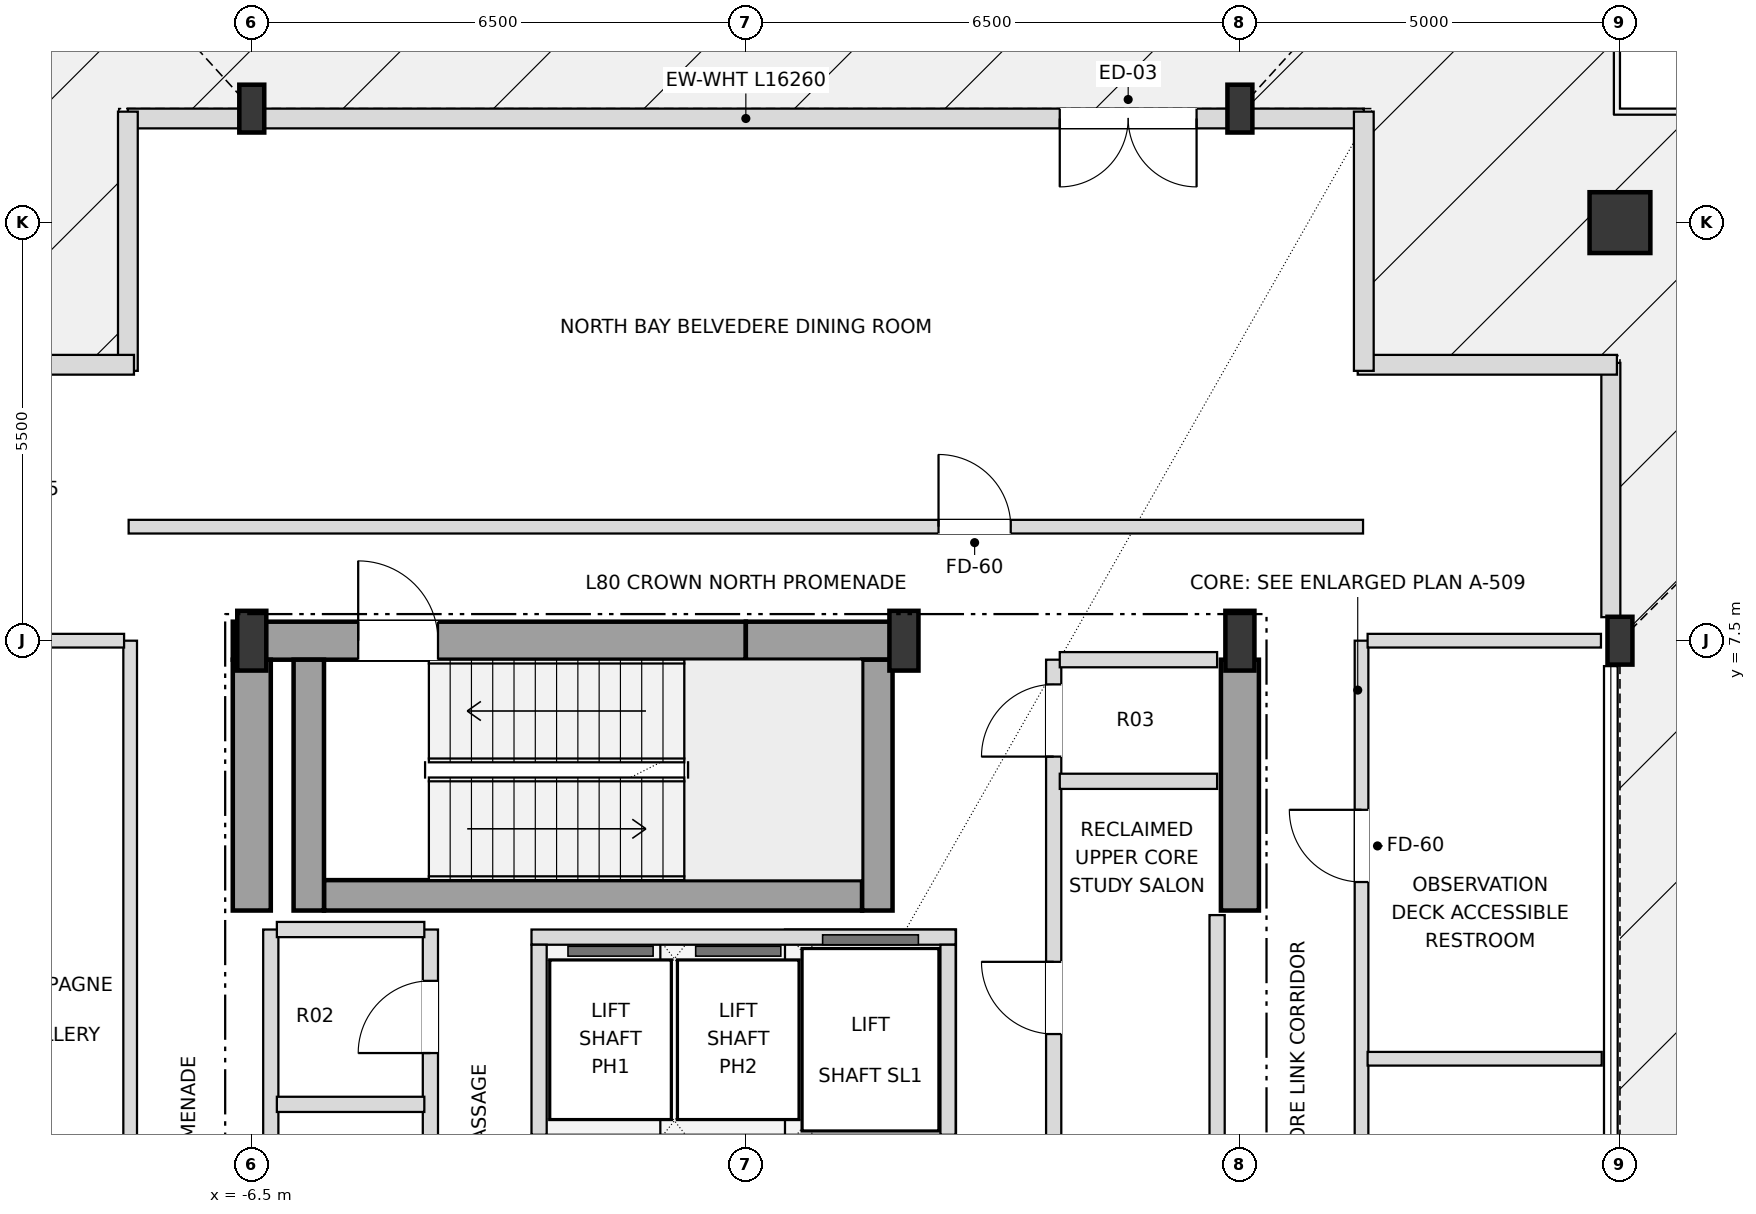
"""IFC4 building model, lengths in metres.
Left out: names, types, materials, properties, quantities, classifications, styles, units other than length and angle.
Written with IfcOpenShell. Run it as: python <this file> out.ifc"""

import sys

from ifc_helpers import new_model, si_unit, direction, frame, frame_2d, origin, origin_2d, place, context, subcontext, project, spatial, rectangle, i_section, extrude, element, fill, save


model = new_model("IFC4")
c1 = context("Model", 3, precision=1e-05, world=origin(), true_north=direction((0.0, 1.0)))
c2 = subcontext(c1, "Body", "Model", "MODEL_VIEW")
j1 = project(units=[si_unit("LENGTHUNIT", "METRE"), si_unit("PLANEANGLEUNIT", "RADIAN")], contexts=[c1])
p1 = place(None, origin())
s1 = spatial("IfcSite", under=j1, at=p1, CompositionType="ELEMENT")
p2 = place(p1, origin())
s2 = spatial("IfcBuilding", under=s1, at=p2, CompositionType="ELEMENT")
p3 = place(p2, frame((0.0, 0.0, 305.1)))
s3 = spatial("IfcBuildingStorey", under=s2, at=p3, CompositionType="ELEMENT", Elevation=305.1)
for number, where, z_axis, x_axis in (
    (1, (-6.5, 7.5, 0.0), (0.0, 0.0, 1.0), (1.0, 0.0, 0.0)),
    (2, (2.08, 7.5, 0.0), (0.0, 0.0, 1.0), (1.0, 0.0, 0.0)),
    (3, (6.5, 7.5, 0.0), (0.0, 0.0, 1.0), (1.0, 0.0, 0.0)),
):
    element("IfcColumn", number, at=place(p3, frame(where, z_axis=z_axis, x_axis=x_axis)), inside=s3, PredefinedType="COLUMN", context=c2, shape_type="SweptSolid", body=[
        extrude(i_section(OverallWidth=0.382, OverallDepth=0.786, WebThickness=0.02, FlangeThickness=0.033, at=origin_2d()), origin(), (0.0, 0.0, 1.0), 4.8),
    ])
p4 = place(p3, frame((11.5, 13.0, 0.0), z_axis=(0.0, 0.0, 1.0), x_axis=(1.0, 0.0, 0.0)))
e4 = element("IfcColumn", 4, at=p4, inside=s3, PredefinedType="COLUMN", context=c2, shape_type="SweptSolid", body=[
    extrude(rectangle(XDim=0.8, YDim=0.8, at=origin_2d()), origin(), (0.0, 0.0, 1.0), 4.62),
])
for number, where, z_axis, x_axis in (
    (5, (11.5, 7.5, 0.0), (0.0, 0.0, 1.0), (1.0, 0.0, 0.0)),
    (6, (-6.5, 14.5, 0.0), (0.0, 0.0, 1.0), (1.0, 0.0, 0.0)),
    (7, (6.5, 14.5, 0.0), (0.0, 0.0, 1.0), (1.0, 0.0, 0.0)),
):
    element("IfcColumn", number, at=place(p3, frame(where, z_axis=z_axis, x_axis=x_axis)), inside=s3, PredefinedType="COLUMN", context=c2, shape_type="SweptSolid", body=[
        extrude(i_section(OverallWidth=0.328, OverallDepth=0.629, WebThickness=0.014, FlangeThickness=0.021, at=origin_2d()), origin(), (0.0, 0.0, 1.0), 4.8),
    ])
p5 = place(p3, frame((8.13, 14.37, 0.0), z_axis=(0.0, 0.0, 1.0), x_axis=(-1.0, 0.0, 0.0)))
e8 = element("IfcWall", 8, at=p5, inside=s3, PredefinedType="SOLIDWALL", context=c2, shape_type="SweptSolid", body=[
    extrude(rectangle(XDim=16.26, YDim=0.26, at=frame_2d((8.13, 0.0))), origin(), (0.0, 0.0, 1.0), 4.218),
])
p6 = place(p5, frame((2.2, 0.0, 0.0)))
e9 = element("IfcOpeningElement", 9, at=p6, cuts=e8, PredefinedType="OPENING", context=c2, shape_type="SweptSolid", body=[
    extrude(rectangle(XDim=1.8, YDim=2.3, at=frame_2d((0.9, 1.15))), frame((0.0, 0.14, 0.0), z_axis=(0.0, -1.0, 0.0), x_axis=(1.0, 0.0, 0.0)), (0.0, 0.0, 1.0), 0.28),
])
p7 = place(p3, frame((11.38, 7.81, 0.0), z_axis=(0.0, 0.0, 1.0), x_axis=(0.0, 1.0, 0.0)))
e10 = element("IfcWall", 10, at=p7, inside=s3, PredefinedType="SOLIDWALL", context=c2, shape_type="SweptSolid", body=[
    extrude(rectangle(XDim=3.345, YDim=0.25, at=frame_2d((1.673, 0.0))), origin(), (0.0, 0.0, 1.0), 4.55),
])
p8 = place(p3, frame((11.46, 11.13, 0.0), z_axis=(0.0, 0.0, 1.0), x_axis=(-1.0, 0.0, 0.0)))
e11 = element("IfcWall", 11, at=p8, inside=s3, PredefinedType="SOLIDWALL", context=c2, shape_type="SweptSolid", body=[
    extrude(rectangle(XDim=3.41, YDim=0.26, at=frame_2d((1.705, 0.0))), origin(), (0.0, 0.0, 1.0), 4.55),
])
for number, where, z_axis, x_axis in (
    (12, (8.13, 11.05, 0.0), (0.0, 0.0, 1.0), (0.0, 1.0, 0.0)),
    (13, (-8.13, 14.46, 0.0), (0.0, 0.0, 1.0), (0.0, -1.0, 0.0)),
):
    element("IfcWall", number, at=place(p3, frame(where, z_axis=z_axis, x_axis=x_axis)), inside=s3, PredefinedType="SOLIDWALL", context=c2, shape_type="SweptSolid", body=[
        extrude(rectangle(XDim=3.41, YDim=0.26, at=frame_2d((1.705, 0.0))), origin(), (0.0, 0.0, 1.0), 4.218),
    ])
p9 = place(p3, frame((-8.05, 11.13, 0.0), z_axis=(0.0, 0.0, 1.0), x_axis=(-1.0, 0.0, 0.0)))
e14 = element("IfcWall", 14, at=p9, inside=s3, PredefinedType="SOLIDWALL", context=c2, shape_type="SweptSolid", body=[
    extrude(rectangle(XDim=3.41, YDim=0.26, at=frame_2d((1.705, 0.0))), origin(), (0.0, 0.0, 1.0), 4.55),
])
p10 = place(p3, frame((-6.75, 7.5, 0.0), z_axis=(0.0, 0.0, 1.0), x_axis=(1.0, 0.0, 0.0)))
e15 = element("IfcWall", 15, at=p10, inside=s3, PredefinedType="SHEAR", context=c2, shape_type="SweptSolid", body=[
    extrude(rectangle(XDim=6.75, YDim=0.5, at=frame_2d((3.375, 0.0))), origin(), (0.0, 0.0, 1.0), 4.55),
])
p11 = place(p10, frame((1.65, 0.0, 0.0)))
e16 = element("IfcOpeningElement", 16, at=p11, cuts=e15, PredefinedType="OPENING", context=c2, shape_type="SweptSolid", body=[
    extrude(rectangle(XDim=1.05, YDim=2.15, at=frame_2d((0.525, 1.075))), frame((0.0, 0.26, 0.0), z_axis=(0.0, -1.0, 0.0), x_axis=(1.0, 0.0, 0.0)), (0.0, 0.0, 1.0), 0.52),
])
p12 = place(p3, frame((0.0, 7.5, 0.0), z_axis=(0.0, 0.0, 1.0), x_axis=(1.0, 0.0, 0.0)))
e17 = element("IfcWall", 17, at=p12, inside=s3, PredefinedType="SHEAR", context=c2, shape_type="SweptSolid", body=[
    extrude(rectangle(XDim=2.08, YDim=0.5, at=frame_2d((1.04, 0.0))), origin(), (0.0, 0.0, 1.0), 4.55),
])
for number, where, z_axis, x_axis in (
    (18, (-6.5, 3.95, 0.0), (0.0, 0.0, 1.0), (0.0, 1.0, 0.0)),
    (19, (6.5, 3.95, 0.0), (0.0, 0.0, 1.0), (0.0, 1.0, 0.0)),
):
    element("IfcWall", number, at=place(p3, frame(where, z_axis=z_axis, x_axis=x_axis)), inside=s3, PredefinedType="SHEAR", context=c2, shape_type="SweptSolid", body=[
        extrude(rectangle(XDim=3.3, YDim=0.5, at=frame_2d((1.65, 0.0))), origin(), (0.0, 0.0, 1.0), 4.55),
    ])
p13 = place(p3, frame((-5.55, 4.15, 0.0), z_axis=(0.0, 0.0, 1.0), x_axis=(1.0, 0.0, 0.0)))
e20 = element("IfcWall", 20, at=p13, inside=s3, PredefinedType="SHEAR", context=c2, shape_type="SweptSolid", body=[
    extrude(rectangle(XDim=7.08, YDim=0.4, at=frame_2d((3.54, 0.0))), origin(), (0.0, 0.0, 1.0), 4.55),
])
for number, where, z_axis, x_axis in (
    (21, (1.73, 3.95, 0.0), (0.0, 0.0, 1.0), (0.0, 1.0, 0.0)),
    (22, (-5.75, 3.95, 0.0), (0.0, 0.0, 1.0), (0.0, 1.0, 0.0)),
):
    element("IfcWall", number, at=place(p3, frame(where, z_axis=z_axis, x_axis=x_axis)), inside=s3, PredefinedType="SHEAR", context=c2, shape_type="SweptSolid", body=[
        extrude(rectangle(XDim=3.3, YDim=0.4, at=frame_2d((1.65, 0.0))), origin(), (0.0, 0.0, 1.0), 4.55),
    ])
p14 = place(p3, frame((-2.82, 3.6, 0.0), z_axis=(0.0, 0.0, 1.0), x_axis=(1.0, 0.0, 0.0)))
e23 = element("IfcWall", 23, at=p14, inside=s3, PredefinedType="SOLIDWALL", context=c2, shape_type="SweptSolid", body=[
    extrude(rectangle(XDim=5.58, YDim=0.2, at=frame_2d((2.79, 0.0))), origin(), (0.0, 0.0, 1.0), 4.55),
])
for number, where, z_axis, x_axis in (
    (24, (-2.72, 1.0, 0.0), (0.0, 0.0, 1.0), (0.0, 1.0, 0.0)),
    (25, (2.66, 1.0, 0.0), (0.0, 0.0, 1.0), (0.0, 1.0, 0.0)),
):
    element("IfcWall", number, at=place(p3, frame(where, z_axis=z_axis, x_axis=x_axis)), inside=s3, PredefinedType="SOLIDWALL", context=c2, shape_type="SweptSolid", body=[
        extrude(rectangle(XDim=2.5, YDim=0.2, at=frame_2d((1.25, 0.0))), origin(), (0.0, 0.0, 1.0), 4.55),
    ])
p15 = place(p3, frame((-8.1, -7.5, 0.0), z_axis=(0.0, 0.0, 1.0), x_axis=(0.0, 1.0, 0.0)))
e26 = element("IfcWall", 26, at=p15, inside=s3, PredefinedType="PARTITIONING", context=c2, shape_type="SweptSolid", body=[
    extrude(rectangle(XDim=15.0, YDim=0.18, at=frame_2d((7.5, 0.0))), origin(), (0.0, 0.0, 1.0), 4.55),
])
p16 = place(p15, frame((4.525, 0.0, 0.0)))
e27 = element("IfcOpeningElement", 27, at=p16, cuts=e26, PredefinedType="OPENING", context=c2, shape_type="SweptSolid", body=[
    extrude(rectangle(XDim=0.95, YDim=2.15, at=frame_2d((0.475, 1.075))), frame((0.0, 0.1, 0.0), z_axis=(0.0, -1.0, 0.0), x_axis=(1.0, 0.0, 0.0)), (0.0, 0.0, 1.0), 0.2),
])
p17 = place(p3, frame((-6.25, -3.64, 0.0), z_axis=(0.0, 0.0, 1.0), x_axis=(0.0, 1.0, 0.0)))
e28 = element("IfcWall", 28, at=p17, inside=s3, PredefinedType="SOLIDWALL", context=c2, shape_type="SweptSolid", body=[
    extrude(rectangle(XDim=7.34, YDim=0.2, at=frame_2d((3.67, 0.0))), origin(), (0.0, 0.0, 1.0), 4.55),
])
p18 = place(p3, frame((-4.15, -3.7, 0.0), z_axis=(0.0, 0.0, 1.0), x_axis=(0.0, 1.0, 0.0)))
e29 = element("IfcWall", 29, at=p18, inside=s3, PredefinedType="SOLIDWALL", context=c2, shape_type="SweptSolid", body=[
    extrude(rectangle(XDim=7.4, YDim=0.2, at=frame_2d((3.7, 0.0))), origin(), (0.0, 0.0, 1.0), 4.55),
])
p19 = place(p18, frame((2.025, 0.0, 0.0)))
e30 = element("IfcOpeningElement", 30, at=p19, cuts=e29, PredefinedType="OPENING", context=c2, shape_type="SweptSolid", body=[
    extrude(rectangle(XDim=0.95, YDim=2.15, at=frame_2d((0.475, 1.075))), frame((0.0, 0.11, 0.0), z_axis=(0.0, -1.0, 0.0), x_axis=(1.0, 0.0, 0.0)), (0.0, 0.0, 1.0), 0.22),
])
p20 = place(p18, frame((5.775, 0.0, 0.0)))
e31 = element("IfcOpeningElement", 31, at=p20, cuts=e29, PredefinedType="OPENING", context=c2, shape_type="SweptSolid", body=[
    extrude(rectangle(XDim=0.95, YDim=2.15, at=frame_2d((0.475, 1.075))), frame((0.0, 0.11, 0.0), z_axis=(0.0, -1.0, 0.0), x_axis=(1.0, 0.0, 0.0)), (0.0, 0.0, 1.0), 0.22),
])
p21 = place(p3, frame((4.05, 0.45, 0.0), z_axis=(0.0, 0.0, 1.0), x_axis=(0.0, 1.0, 0.0)))
e32 = element("IfcWall", 32, at=p21, inside=s3, PredefinedType="SOLIDWALL", context=c2, shape_type="SweptSolid", body=[
    extrude(rectangle(XDim=6.8, YDim=0.2, at=frame_2d((3.4, 0.0))), origin(), (0.0, 0.0, 1.0), 4.55),
])
p22 = place(p21, frame((1.875, 0.0, 0.0)))
e33 = element("IfcOpeningElement", 33, at=p22, cuts=e32, PredefinedType="OPENING", context=c2, shape_type="SweptSolid", body=[
    extrude(rectangle(XDim=0.95, YDim=2.15, at=frame_2d((0.475, 1.075))), frame((0.0, 0.11, 0.0), z_axis=(0.0, -1.0, 0.0), x_axis=(1.0, 0.0, 0.0)), (0.0, 0.0, 1.0), 0.22),
])
p23 = place(p21, frame((5.525, 0.0, 0.0)))
e34 = element("IfcOpeningElement", 34, at=p23, cuts=e32, PredefinedType="OPENING", context=c2, shape_type="SweptSolid", body=[
    extrude(rectangle(XDim=0.95, YDim=2.15, at=frame_2d((0.475, 1.075))), frame((0.0, 0.11, 0.0), z_axis=(0.0, -1.0, 0.0), x_axis=(1.0, 0.0, 0.0)), (0.0, 0.0, 1.0), 0.22),
])
p24 = place(p3, frame((6.2, 0.45, 0.0), z_axis=(0.0, 0.0, 1.0), x_axis=(0.0, 1.0, 0.0)))
e35 = element("IfcWall", 35, at=p24, inside=s3, PredefinedType="SOLIDWALL", context=c2, shape_type="SweptSolid", body=[
    extrude(rectangle(XDim=3.44, YDim=0.2, at=frame_2d((1.72, 0.0))), origin(), (0.0, 0.0, 1.0), 4.55),
])
p25 = place(p3, frame((8.1, -7.5, 0.0), z_axis=(0.0, 0.0, 1.0), x_axis=(0.0, 1.0, 0.0)))
e36 = element("IfcWall", 36, at=p25, inside=s3, PredefinedType="PARTITIONING", context=c2, shape_type="SweptSolid", body=[
    extrude(rectangle(XDim=15.0, YDim=0.18, at=frame_2d((7.5, 0.0))), origin(), (0.0, 0.0, 1.0), 4.55),
])
p26 = place(p25, frame((4.525, 0.0, 0.0)))
e37 = element("IfcOpeningElement", 37, at=p26, cuts=e36, PredefinedType="OPENING", context=c2, shape_type="SweptSolid", body=[
    extrude(rectangle(XDim=0.95, YDim=2.15, at=frame_2d((0.475, 1.075))), frame((0.0, 0.1, 0.0), z_axis=(0.0, -1.0, 0.0), x_axis=(1.0, 0.0, 0.0)), (0.0, 0.0, 1.0), 0.2),
])
p27 = place(p25, frame((11.825, 0.0, 0.0)))
e38 = element("IfcOpeningElement", 38, at=p27, cuts=e36, PredefinedType="OPENING", context=c2, shape_type="SweptSolid", body=[
    extrude(rectangle(XDim=0.95, YDim=2.15, at=frame_2d((0.475, 1.075))), frame((0.0, 0.1, 0.0), z_axis=(0.0, -1.0, 0.0), x_axis=(1.0, 0.0, 0.0)), (0.0, 0.0, 1.0), 0.2),
])
p28 = place(p3, frame((-6.17, 1.4, 0.0), z_axis=(0.0, 0.0, 1.0), x_axis=(1.0, 0.0, 0.0)))
e39 = element("IfcWall", 39, at=p28, inside=s3, PredefinedType="SOLIDWALL", context=c2, shape_type="SweptSolid", body=[
    extrude(rectangle(XDim=1.94, YDim=0.2, at=frame_2d((0.97, 0.0))), origin(), (0.0, 0.0, 1.0), 4.55),
])
p29 = place(p3, frame((8.18, 2.0, 0.0), z_axis=(0.0, 0.0, 1.0), x_axis=(1.0, 0.0, 0.0)))
e40 = element("IfcWall", 40, at=p29, inside=s3, PredefinedType="PARTITIONING", context=c2, shape_type="SweptSolid", body=[
    extrude(rectangle(XDim=3.08, YDim=0.18, at=frame_2d((1.54, 0.0))), origin(), (0.0, 0.0, 1.0), 4.55),
])
p30 = place(p3, frame((-6.17, 3.7, 0.0), z_axis=(0.0, 0.0, 1.0), x_axis=(1.0, 0.0, 0.0)))
e41 = element("IfcWall", 41, at=p30, inside=s3, PredefinedType="SOLIDWALL", context=c2, shape_type="SweptSolid", body=[
    extrude(rectangle(XDim=1.94, YDim=0.2, at=frame_2d((0.97, 0.0))), origin(), (0.0, 0.0, 1.0), 4.55),
])
for number, where, z_axis, x_axis in (
    (42, (4.13, 5.65, 0.0), (0.0, 0.0, 1.0), (1.0, 0.0, 0.0)),
    (43, (4.13, 7.25, 0.0), (0.0, 0.0, 1.0), (1.0, 0.0, 0.0)),
):
    element("IfcWall", number, at=place(p3, frame(where, z_axis=z_axis, x_axis=x_axis)), inside=s3, PredefinedType="SOLIDWALL", context=c2, shape_type="SweptSolid", body=[
        extrude(rectangle(XDim=2.07, YDim=0.2, at=frame_2d((1.035, 0.0))), origin(), (0.0, 0.0, 1.0), 4.55),
    ])
for number, where, z_axis, x_axis in (
    (44, (-11.25, 7.5, 0.0), (0.0, 0.0, 1.0), (1.0, 0.0, 0.0)),
    (45, (8.18, 7.5, 0.0), (0.0, 0.0, 1.0), (1.0, 0.0, 0.0)),
):
    element("IfcWall", number, at=place(p3, frame(where, z_axis=z_axis, x_axis=x_axis)), inside=s3, PredefinedType="PARTITIONING", context=c2, shape_type="SweptSolid", body=[
        extrude(rectangle(XDim=3.07, YDim=0.18, at=frame_2d((1.535, 0.0))), origin(), (0.0, 0.0, 1.0), 4.218),
    ])
p31 = place(p3, frame((-8.12, 9.0, 0.0), z_axis=(0.0, 0.0, 1.0), x_axis=(1.0, 0.0, 0.0)))
e46 = element("IfcWall", 46, at=p31, inside=s3, PredefinedType="PARTITIONING", context=c2, shape_type="SweptSolid", body=[
    extrude(rectangle(XDim=16.24, YDim=0.18, at=frame_2d((8.12, 0.0))), origin(), (0.0, 0.0, 1.0), 4.55),
])
p32 = place(p31, frame((10.655, 0.0, 0.0)))
e47 = element("IfcOpeningElement", 47, at=p32, cuts=e46, PredefinedType="OPENING", context=c2, shape_type="SweptSolid", body=[
    extrude(rectangle(XDim=0.95, YDim=2.15, at=frame_2d((0.475, 1.075))), frame((0.0, 0.1, 0.0), z_axis=(0.0, -1.0, 0.0), x_axis=(1.0, 0.0, 0.0)), (0.0, 0.0, 1.0), 0.2),
])
p33 = place(p6, origin())
e48 = element("IfcDoor", 48, at=p33, inside=s3, OperationType="DOUBLE_DOOR_SINGLE_SWING", PredefinedType="DOOR", context=c2, shape_type="SweptSolid", body=[
    extrude(rectangle(XDim=1.8, YDim=2.3, at=frame_2d((0.9, 1.15))), frame((0.0, 0.025, 0.0), z_axis=(0.0, -1.0, 0.0), x_axis=(1.0, 0.0, 0.0)), (0.0, 0.0, 1.0), 0.05),
])
fill(e9, e48)
p34 = place(p11, origin())
e49 = element("IfcDoor", 49, at=p34, inside=s3, OperationType="SINGLE_SWING_LEFT", PredefinedType="DOOR", context=c2, shape_type="SweptSolid", body=[
    extrude(rectangle(XDim=1.05, YDim=2.15, at=frame_2d((0.525, 1.075))), frame((0.0, 0.025, 0.0), z_axis=(0.0, -1.0, 0.0), x_axis=(1.0, 0.0, 0.0)), (0.0, 0.0, 1.0), 0.05),
])
fill(e16, e49)
p35 = place(p20, origin())
e50 = element("IfcDoor", 50, at=p35, inside=s3, OperationType="SINGLE_SWING_LEFT", PredefinedType="DOOR", context=c2, shape_type="SweptSolid", body=[
    extrude(rectangle(XDim=0.95, YDim=2.15, at=frame_2d((0.475, 1.075))), frame((0.0, 0.025, 0.0), z_axis=(0.0, -1.0, 0.0), x_axis=(1.0, 0.0, 0.0)), (0.0, 0.0, 1.0), 0.05),
])
fill(e31, e50)
p36 = place(p22, origin())
e51 = element("IfcDoor", 51, at=p36, inside=s3, OperationType="SINGLE_SWING_RIGHT", PredefinedType="DOOR", context=c2, shape_type="SweptSolid", body=[
    extrude(rectangle(XDim=0.95, YDim=2.15, at=frame_2d((0.475, 1.075))), frame((0.0, 0.025, 0.0), z_axis=(0.0, -1.0, 0.0), x_axis=(1.0, 0.0, 0.0)), (0.0, 0.0, 1.0), 0.05),
])
fill(e33, e51)
p37 = place(p23, origin())
e52 = element("IfcDoor", 52, at=p37, inside=s3, OperationType="SINGLE_SWING_LEFT", PredefinedType="DOOR", context=c2, shape_type="SweptSolid", body=[
    extrude(rectangle(XDim=0.95, YDim=2.15, at=frame_2d((0.475, 1.075))), frame((0.0, 0.025, 0.0), z_axis=(0.0, -1.0, 0.0), x_axis=(1.0, 0.0, 0.0)), (0.0, 0.0, 1.0), 0.05),
])
fill(e34, e52)
p38 = place(p32, origin())
e53 = element("IfcDoor", 53, at=p38, inside=s3, OperationType="SINGLE_SWING_LEFT", PredefinedType="DOOR", context=c2, shape_type="SweptSolid", body=[
    extrude(rectangle(XDim=0.95, YDim=2.15, at=frame_2d((0.475, 1.075))), frame((0.0, 0.025, 0.0), z_axis=(0.0, -1.0, 0.0), x_axis=(1.0, 0.0, 0.0)), (0.0, 0.0, 1.0), 0.05),
])
fill(e47, e53)
p39 = place(p27, origin())
e54 = element("IfcDoor", 54, at=p39, inside=s3, OperationType="SINGLE_SWING_RIGHT", PredefinedType="DOOR", context=c2, shape_type="SweptSolid", body=[
    extrude(rectangle(XDim=0.95, YDim=2.15, at=frame_2d((0.475, 1.075))), frame((0.0, 0.025, 0.0), z_axis=(0.0, -1.0, 0.0), x_axis=(1.0, 0.0, 0.0)), (0.0, 0.0, 1.0), 0.05),
])
fill(e38, e54)
save(model, sys.argv[1])
